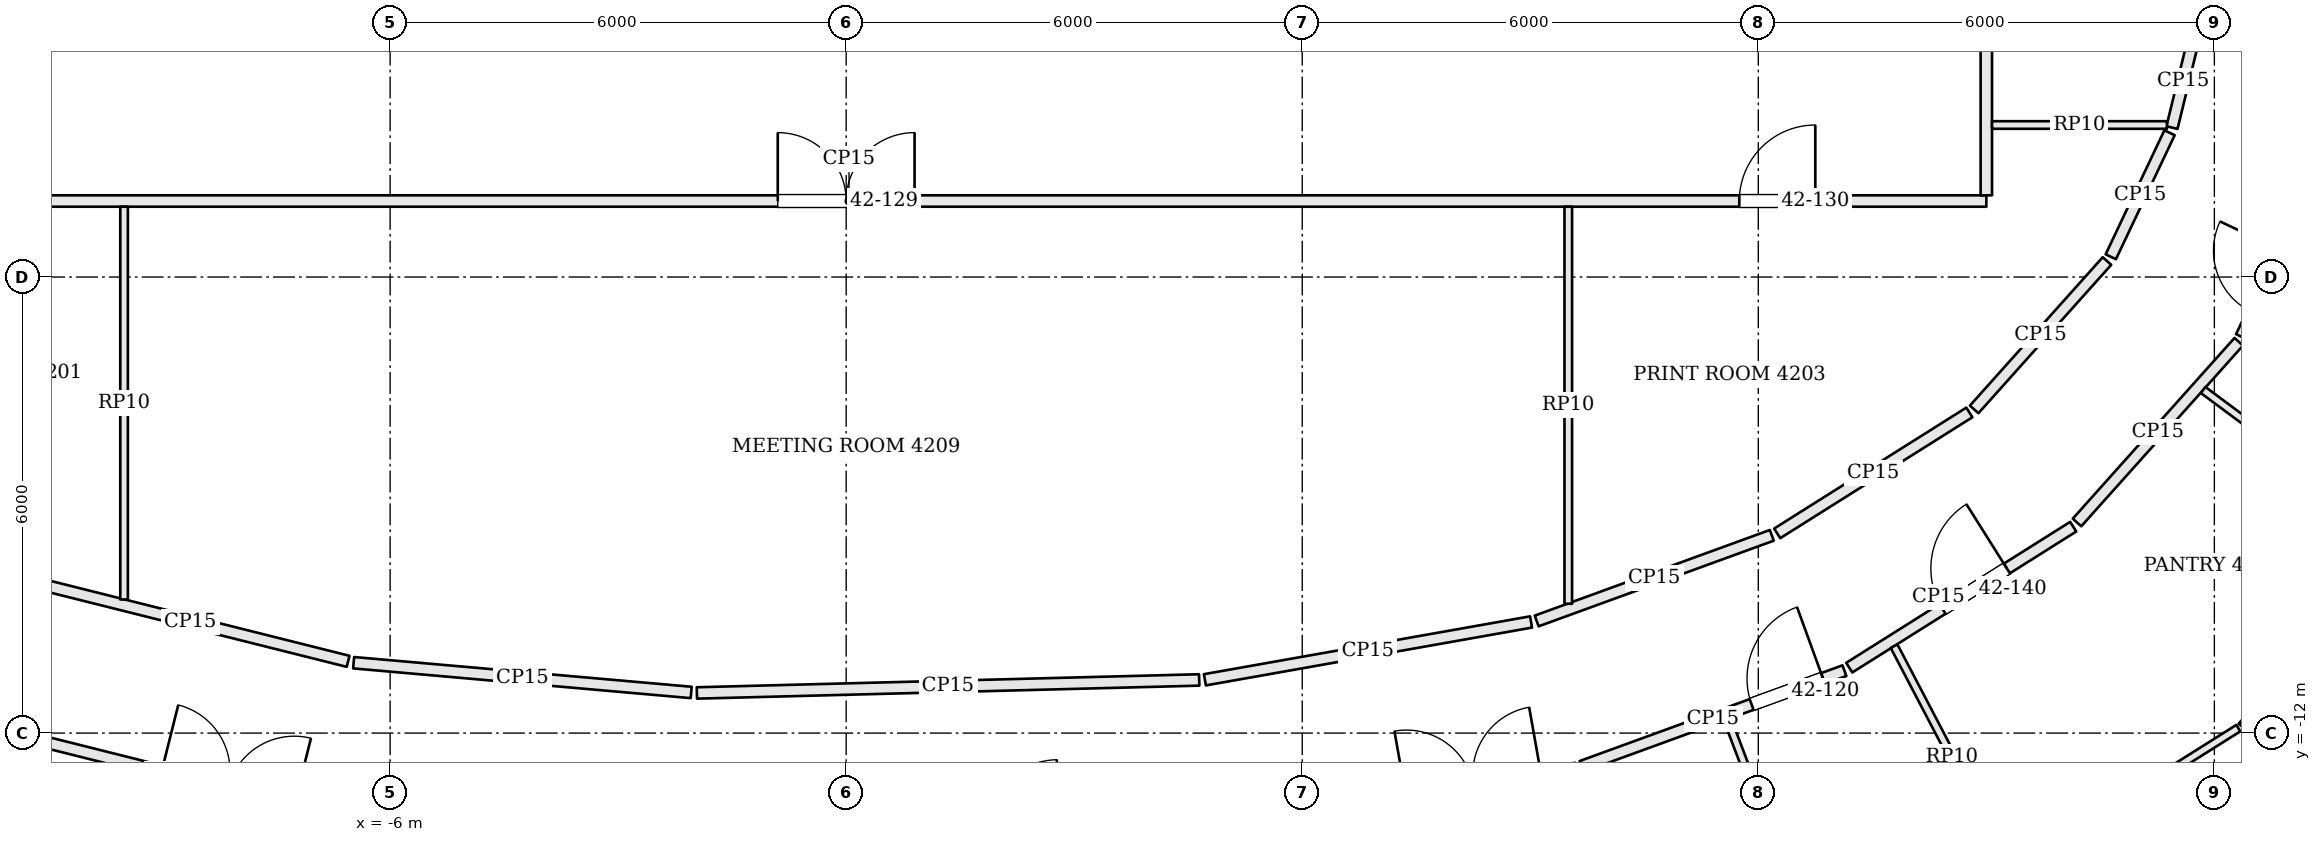
"""IFC4 building model, lengths in metres.
Left out: names, types, materials, properties, quantities, classifications, styles, units other than length and angle.
Written with IfcOpenShell. Run it as: python <this file> out.ifc"""

import sys

from ifc_helpers import new_model, si_unit, direction, frame, frame_2d, origin, place, context, subcontext, project, spatial, rectangle, extrude, element, fill, save


model = new_model("IFC4")
c1 = context("Model", 3, precision=1e-05, world=origin(), true_north=direction((0.0, 1.0)))
c2 = subcontext(c1, "Body", "Model", "MODEL_VIEW")
j1 = project(units=[si_unit("LENGTHUNIT", "METRE"), si_unit("PLANEANGLEUNIT", "RADIAN")], contexts=[c1])
p1 = place(None, origin())
s1 = spatial("IfcSite", under=j1, at=p1, CompositionType="ELEMENT")
p2 = place(p1, origin())
s2 = spatial("IfcBuilding", under=s1, at=p2, CompositionType="ELEMENT")
p3 = place(p2, frame((0.0, 0.0, 174.0)))
s3 = spatial("IfcBuildingStorey", under=s2, at=p3, CompositionType="ELEMENT", Elevation=174.0)
p4 = place(p3, frame((-10.897, -12.029, 0.0), z_axis=(0.0, 0.0, 1.0), x_axis=(0.969999087169, -0.24310855783, 0.0)))
e1 = element("IfcWall", 1, at=p4, inside=s3, PredefinedType="PARTITIONING", context=c2, shape_type="SweptSolid", body=[
    extrude(rectangle(XDim=4.211, YDim=0.15, at=frame_2d((2.105, 0.0))), origin(), (0.0, 0.0, 1.0), 3.084),
])
p5 = place(p4, frame((1.95, 0.0, 0.0)))
e2 = element("IfcOpeningElement", 2, at=p5, cuts=e1, PredefinedType="OPENING", context=c2, shape_type="SweptSolid", body=[
    extrude(rectangle(XDim=1.8, YDim=2.1, at=frame_2d((0.9, 1.05))), frame((0.0, 0.085, 0.0), z_axis=(0.0, -1.0, 0.0), x_axis=(1.0, 0.0, 0.0)), (0.0, 0.0, 1.0), 0.17),
])
p6 = place(p3, frame((5.992, -13.104, 0.0), z_axis=(0.0, 0.0, 1.0), x_axis=(0.98463249319, 0.174639209096, 0.0)))
e3 = element("IfcWall", 3, at=p6, inside=s3, PredefinedType="PARTITIONING", context=c2, shape_type="SweptSolid", body=[
    extrude(rectangle(XDim=3.67, YDim=0.15, at=frame_2d((1.835, 0.0))), origin(), (0.0, 0.0, 1.0), 3.084),
])
p7 = place(p6, frame((1.4, 0.0, 0.0)))
e4 = element("IfcOpeningElement", 4, at=p7, cuts=e3, PredefinedType="OPENING", context=c2, shape_type="SweptSolid", body=[
    extrude(rectangle(XDim=1.8, YDim=2.1, at=frame_2d((0.9, 1.05))), frame((0.0, 0.085, 0.0), z_axis=(0.0, -1.0, 0.0), x_axis=(1.0, 0.0, 0.0)), (0.0, 0.0, 1.0), 0.17),
])
p8 = place(p3, frame((9.676, -12.438, 0.0), z_axis=(0.0, 0.0, 1.0), x_axis=(0.939640289748, 0.342163887461, 0.0)))
e5 = element("IfcWall", 5, at=p8, inside=s3, PredefinedType="PARTITIONING", context=c2, shape_type="SweptSolid", body=[
    extrude(rectangle(XDim=3.68, YDim=0.15, at=frame_2d((1.84, 0.0))), origin(), (0.0, 0.0, 1.0), 3.084),
])
p9 = place(p8, frame((2.38, 0.0, 0.0)))
e6 = element("IfcOpeningElement", 6, at=p9, cuts=e5, PredefinedType="OPENING", context=c2, shape_type="SweptSolid", body=[
    extrude(rectangle(XDim=1.0, YDim=2.4, at=frame_2d((0.5, 1.2))), frame((0.0, 0.085, 0.0), z_axis=(0.0, -1.0, 0.0), x_axis=(1.0, 0.0, 0.0)), (0.0, 0.0, 1.0), 0.17),
])
p10 = place(p3, frame((13.197, -11.139, 0.0), z_axis=(0.0, 0.0, 1.0), x_axis=(0.846390903833, 0.532562144644, 0.0)))
e7 = element("IfcWall", 7, at=p10, inside=s3, PredefinedType="PARTITIONING", context=c2, shape_type="SweptSolid", body=[
    extrude(rectangle(XDim=3.481, YDim=0.15, at=frame_2d((1.741, 0.0))), origin(), (0.0, 0.0, 1.0), 3.084),
])
p11 = place(p10, frame((1.45, 0.0, 0.0)))
e8 = element("IfcOpeningElement", 8, at=p11, cuts=e7, PredefinedType="OPENING", context=c2, shape_type="SweptSolid", body=[
    extrude(rectangle(XDim=1.0, YDim=2.1, at=frame_2d((0.5, 1.05))), frame((0.0, 0.085, 0.0), z_axis=(0.0, -1.0, 0.0), x_axis=(1.0, 0.0, 0.0)), (0.0, 0.0, 1.0), 0.17),
])
p12 = place(p3, frame((16.193, -9.229, 0.0), z_axis=(0.0, 0.0, 1.0), x_axis=(0.666882089048, 0.745163256815, 0.0)))
e9 = element("IfcWall", 9, at=p12, inside=s3, PredefinedType="PARTITIONING", context=c2, shape_type="SweptSolid", body=[
    extrude(rectangle(XDim=3.19, YDim=0.15, at=frame_2d((1.595, 0.0))), origin(), (0.0, 0.0, 1.0), 3.084),
])
p13 = place(p3, frame((18.353, -6.784, 0.0), z_axis=(0.0, 0.0, 1.0), x_axis=(0.428125964575, 0.90371907054, 0.0)))
e10 = element("IfcWall", 10, at=p13, inside=s3, PredefinedType="PARTITIONING", context=c2, shape_type="SweptSolid", body=[
    extrude(rectangle(XDim=1.589, YDim=0.15, at=frame_2d((0.795, 0.0))), origin(), (0.0, 0.0, 1.0), 3.084),
])
p14 = place(p13, frame((0.35, 0.0, 0.0)))
e11 = element("IfcOpeningElement", 11, at=p14, cuts=e10, PredefinedType="OPENING", context=c2, shape_type="SweptSolid", body=[
    extrude(rectangle(XDim=0.9, YDim=2.1, at=frame_2d((0.45, 1.05))), frame((0.0, 0.085, 0.0), z_axis=(0.0, -1.0, 0.0), x_axis=(1.0, 0.0, 0.0)), (0.0, 0.0, 1.0), 0.17),
])
p15 = place(p3, frame((17.739, -2.818, 0.0), z_axis=(0.0, 0.0, 1.0), x_axis=(-0.236884307907, -0.971537865792, 0.0)))
e12 = element("IfcWall", 12, at=p15, inside=s3, PredefinedType="PARTITIONING", context=c2, shape_type="SweptSolid", body=[
    extrude(rectangle(XDim=1.251, YDim=0.15, at=frame_2d((0.625, 0.0))), origin(), (0.0, 0.0, 1.0), 3.084),
])
p16 = place(p3, frame((17.41, -4.102, 0.0), z_axis=(0.0, 0.0, 1.0), x_axis=(-0.428074720318, -0.903743345107, 0.0)))
e13 = element("IfcWall", 13, at=p16, inside=s3, PredefinedType="PARTITIONING", context=c2, shape_type="SweptSolid", body=[
    extrude(rectangle(XDim=1.806, YDim=0.15, at=frame_2d((0.903, 0.0))), origin(), (0.0, 0.0, 1.0), 3.084),
])
p17 = place(p3, frame((16.587, -5.789, 0.0), z_axis=(0.0, 0.0, 1.0), x_axis=(-0.666887460656, -0.745158449472, 0.0)))
e14 = element("IfcWall", 14, at=p17, inside=s3, PredefinedType="PARTITIONING", context=c2, shape_type="SweptSolid", body=[
    extrude(rectangle(XDim=2.62, YDim=0.15, at=frame_2d((1.31, 0.0))), origin(), (0.0, 0.0, 1.0), 3.084),
])
p18 = place(p3, frame((14.777, -7.781, 0.0), z_axis=(0.0, 0.0, 1.0), x_axis=(-0.846359741043, -0.532611667862, 0.0)))
e15 = element("IfcWall", 15, at=p18, inside=s3, PredefinedType="PARTITIONING", context=c2, shape_type="SweptSolid", body=[
    extrude(rectangle(XDim=2.987, YDim=0.15, at=frame_2d((1.494, 0.0))), origin(), (0.0, 0.0, 1.0), 3.084),
])
p19 = place(p3, frame((12.178, -9.398, 0.0), z_axis=(0.0, 0.0, 1.0), x_axis=(-0.939609240084, -0.342249143093, 0.0)))
e16 = element("IfcWall", 16, at=p19, inside=s3, PredefinedType="PARTITIONING", context=c2, shape_type="SweptSolid", body=[
    extrude(rectangle(XDim=3.292, YDim=0.15, at=frame_2d((1.646, 0.0))), origin(), (0.0, 0.0, 1.0), 3.084),
])
p20 = place(p3, frame((9.01, -10.538, 0.0), z_axis=(0.0, 0.0, 1.0), x_axis=(-0.984645638575, -0.174565077936, 0.0)))
e17 = element("IfcWall", 17, at=p20, inside=s3, PredefinedType="PARTITIONING", context=c2, shape_type="SweptSolid", body=[
    extrude(rectangle(XDim=4.358, YDim=0.15, at=frame_2d((2.179, 0.0))), origin(), (0.0, 0.0, 1.0), 3.084),
])
p21 = place(p3, frame((4.645, -11.301, 0.0), z_axis=(0.0, 0.0, 1.0), x_axis=(-0.9996648469, -0.02588810291, 0.0)))
e18 = element("IfcWall", 18, at=p21, inside=s3, PredefinedType="PARTITIONING", context=c2, shape_type="SweptSolid", body=[
    extrude(rectangle(XDim=6.611, YDim=0.15, at=frame_2d((3.305, 0.0))), origin(), (0.0, 0.0, 1.0), 3.084),
])
p22 = place(p3, frame((-2.039, -11.465, 0.0), z_axis=(0.0, 0.0, 1.0), x_axis=(-0.996139855484, 0.087780341286, 0.0)))
e19 = element("IfcWall", 19, at=p22, inside=s3, PredefinedType="PARTITIONING", context=c2, shape_type="SweptSolid", body=[
    extrude(rectangle(XDim=4.458, YDim=0.15, at=frame_2d((2.229, 0.0))), origin(), (0.0, 0.0, 1.0), 3.084),
])
p23 = place(p3, frame((-6.553, -11.056, 0.0), z_axis=(0.0, 0.0, 1.0), x_axis=(-0.970004917182, 0.243085294995, 0.0)))
e20 = element("IfcWall", 20, at=p23, inside=s3, PredefinedType="PARTITIONING", context=c2, shape_type="SweptSolid", body=[
    extrude(rectangle(XDim=4.284, YDim=0.15, at=frame_2d((2.142, 0.0))), origin(), (0.0, 0.0, 1.0), 3.084),
])
p24 = place(p3, frame((-14.925, -5.0, 0.0), z_axis=(0.0, 0.0, 1.0), x_axis=(1.0, 0.0, 0.0)))
e21 = element("IfcWall", 21, at=p24, inside=s3, PredefinedType="PARTITIONING", context=c2, shape_type="SweptSolid", body=[
    extrude(rectangle(XDim=29.925, YDim=0.15, at=frame_2d((14.962, 0.0))), origin(), (0.0, 0.0, 1.0), 3.084),
])
p25 = place(p24, frame((2.175, 0.0, 0.0)))
e22 = element("IfcOpeningElement", 22, at=p25, cuts=e21, PredefinedType="OPENING", context=c2, shape_type="SweptSolid", body=[
    extrude(rectangle(XDim=1.0, YDim=2.1, at=frame_2d((0.5, 1.05))), frame((0.0, 0.085, 0.0), z_axis=(0.0, -1.0, 0.0), x_axis=(1.0, 0.0, 0.0)), (0.0, 0.0, 1.0), 0.17),
])
p26 = place(p24, frame((14.025, 0.0, 0.0)))
e23 = element("IfcOpeningElement", 23, at=p26, cuts=e21, PredefinedType="OPENING", context=c2, shape_type="SweptSolid", body=[
    extrude(rectangle(XDim=1.8, YDim=2.1, at=frame_2d((0.9, 1.05))), frame((0.0, 0.085, 0.0), z_axis=(0.0, -1.0, 0.0), x_axis=(1.0, 0.0, 0.0)), (0.0, 0.0, 1.0), 0.17),
])
p27 = place(p24, frame((26.675, 0.0, 0.0)))
e24 = element("IfcOpeningElement", 24, at=p27, cuts=e21, PredefinedType="OPENING", context=c2, shape_type="SweptSolid", body=[
    extrude(rectangle(XDim=1.0, YDim=2.1, at=frame_2d((0.5, 1.05))), frame((0.0, 0.085, 0.0), z_axis=(0.0, -1.0, 0.0), x_axis=(1.0, 0.0, 0.0)), (0.0, 0.0, 1.0), 0.17),
])
p28 = place(p3, frame((15.0, -4.925, 0.0), z_axis=(0.0, 0.0, 1.0), x_axis=(0.0, 1.0, 0.0)))
e25 = element("IfcWall", 25, at=p28, inside=s3, PredefinedType="PARTITIONING", context=c2, shape_type="SweptSolid", body=[
    extrude(rectangle(XDim=12.583, YDim=0.15, at=frame_2d((6.292, 0.0))), origin(), (0.0, 0.0, 1.0), 3.084),
])
p29 = place(p28, frame((6.441, 0.0, 0.0)))
e26 = element("IfcOpeningElement", 26, at=p29, cuts=e25, PredefinedType="OPENING", context=c2, shape_type="SweptSolid", body=[
    extrude(rectangle(XDim=0.7, YDim=2.1, at=frame_2d((0.35, 1.05))), frame((0.0, 0.085, 0.0), z_axis=(0.0, -1.0, 0.0), x_axis=(1.0, 0.0, 0.0)), (0.0, 0.0, 1.0), 0.17),
])
p30 = place(p3, frame((21.149, -8.789, 0.0), z_axis=(0.0, 0.0, 1.0), x_axis=(-0.666915902537, -0.745132994132, 0.0)))
e27 = element("IfcWall", 27, at=p30, inside=s3, PredefinedType="PARTITIONING", context=c2, shape_type="SweptSolid", body=[
    extrude(rectangle(XDim=4.186, YDim=0.1, at=frame_2d((2.093, 0.0))), origin(), (0.0, 0.0, 1.0), 3.084),
])
p31 = place(p30, frame((1.869, 0.0, 0.0)))
e28 = element("IfcOpeningElement", 28, at=p31, cuts=e27, PredefinedType="OPENING", context=c2, shape_type="SweptSolid", body=[
    extrude(rectangle(XDim=0.9, YDim=2.1, at=frame_2d((0.45, 1.05))), frame((0.0, 0.06, 0.0), z_axis=(0.0, -1.0, 0.0), x_axis=(1.0, 0.0, 0.0)), (0.0, 0.0, 1.0), 0.12),
])
p32 = place(p3, frame((18.316, -11.935, 0.0), z_axis=(0.0, 0.0, 1.0), x_axis=(-0.84637539713, -0.532586788358, 0.0)))
e29 = element("IfcWall", 29, at=p32, inside=s3, PredefinedType="PARTITIONING", context=c2, shape_type="SweptSolid", body=[
    extrude(rectangle(XDim=4.346, YDim=0.1, at=frame_2d((2.173, 0.0))), origin(), (0.0, 0.0, 1.0), 3.084),
])
p33 = place(p3, frame((11.594, -11.819, 0.0), z_axis=(0.0, 0.0, 1.0), x_axis=(0.354584575087, -0.935023945742, 0.0)))
e30 = element("IfcWall", 30, at=p33, inside=s3, PredefinedType="PARTITIONING", context=c2, shape_type="SweptSolid", body=[
    extrude(rectangle(XDim=3.275, YDim=0.1, at=frame_2d((1.638, 0.0))), origin(), (0.0, 0.0, 1.0), 3.084),
])
p34 = place(p3, frame((13.786, -10.856, 0.0), z_axis=(0.0, 0.0, 1.0), x_axis=(0.464015323866, -0.885827172318, 0.0)))
e31 = element("IfcWall", 31, at=p34, inside=s3, PredefinedType="PARTITIONING", context=c2, shape_type="SweptSolid", body=[
    extrude(rectangle(XDim=3.286, YDim=0.1, at=frame_2d((1.643, 0.0))), origin(), (0.0, 0.0, 1.0), 3.084),
])
p35 = place(p3, frame((17.853, -7.487, 0.0), z_axis=(0.0, 0.0, 1.0), x_axis=(0.802681916891, -0.596407361034, 0.0)))
e32 = element("IfcWall", 32, at=p35, inside=s3, PredefinedType="PARTITIONING", context=c2, shape_type="SweptSolid", body=[
    extrude(rectangle(XDim=3.289, YDim=0.1, at=frame_2d((1.645, 0.0))), origin(), (0.0, 0.0, 1.0), 3.084),
])
p36 = place(p3, frame((-9.5, -10.242, 0.0), z_axis=(0.0, 0.0, 1.0), x_axis=(0.0, 1.0, 0.0)))
e33 = element("IfcWall", 33, at=p36, inside=s3, PredefinedType="PARTITIONING", context=c2, shape_type="SweptSolid", body=[
    extrude(rectangle(XDim=5.167, YDim=0.1, at=frame_2d((2.583, 0.0))), origin(), (0.0, 0.0, 1.0), 3.084),
])
p37 = place(p3, frame((9.5, -10.299, 0.0), z_axis=(0.0, 0.0, 1.0), x_axis=(0.0, 1.0, 0.0)))
e34 = element("IfcWall", 34, at=p37, inside=s3, PredefinedType="PARTITIONING", context=c2, shape_type="SweptSolid", body=[
    extrude(rectangle(XDim=5.224, YDim=0.1, at=frame_2d((2.612, 0.0))), origin(), (0.0, 0.0, 1.0), 3.084),
])
p38 = place(p3, frame((15.075, -4.0, 0.0), z_axis=(0.0, 0.0, 1.0), x_axis=(1.0, 0.0, 0.0)))
e35 = element("IfcWall", 35, at=p38, inside=s3, PredefinedType="PARTITIONING", context=c2, shape_type="SweptSolid", body=[
    extrude(rectangle(XDim=2.301, YDim=0.1, at=frame_2d((1.15, 0.0))), origin(), (0.0, 0.0, 1.0), 3.084),
])
p39 = place(p9, origin())
e36 = element("IfcDoor", 36, at=p39, inside=s3, OperationType="SINGLE_SWING_RIGHT", PredefinedType="DOOR", context=c2, shape_type="SweptSolid", body=[
    extrude(rectangle(XDim=1.0, YDim=2.4, at=frame_2d((0.5, 1.2))), frame((0.0, 0.025, 0.0), z_axis=(0.0, -1.0, 0.0), x_axis=(1.0, 0.0, 0.0)), (0.0, 0.0, 1.0), 0.05),
])
fill(e6, e36)
p40 = place(p26, origin())
e37 = element("IfcDoor", 37, at=p40, inside=s3, OperationType="DOUBLE_DOOR_SINGLE_SWING", PredefinedType="DOOR", context=c2, shape_type="SweptSolid", body=[
    extrude(rectangle(XDim=1.8, YDim=2.1, at=frame_2d((0.9, 1.05))), frame((0.0, 0.025, 0.0), z_axis=(0.0, -1.0, 0.0), x_axis=(1.0, 0.0, 0.0)), (0.0, 0.0, 1.0), 0.05),
])
fill(e23, e37)
p41 = place(p27, origin())
e38 = element("IfcDoor", 38, at=p41, inside=s3, OperationType="SINGLE_SWING_RIGHT", PredefinedType="DOOR", context=c2, shape_type="SweptSolid", body=[
    extrude(rectangle(XDim=1.0, YDim=2.1, at=frame_2d((0.5, 1.05))), frame((0.0, 0.025, 0.0), z_axis=(0.0, -1.0, 0.0), x_axis=(1.0, 0.0, 0.0)), (0.0, 0.0, 1.0), 0.05),
])
fill(e24, e38)
p42 = place(p11, origin())
e39 = element("IfcDoor", 39, at=p42, inside=s3, OperationType="SINGLE_SWING_RIGHT", PredefinedType="DOOR", context=c2, shape_type="SweptSolid", body=[
    extrude(rectangle(XDim=1.0, YDim=2.1, at=frame_2d((0.5, 1.05))), frame((0.0, 0.025, 0.0), z_axis=(0.0, -1.0, 0.0), x_axis=(1.0, 0.0, 0.0)), (0.0, 0.0, 1.0), 0.05),
])
fill(e8, e39)
save(model, sys.argv[1])
